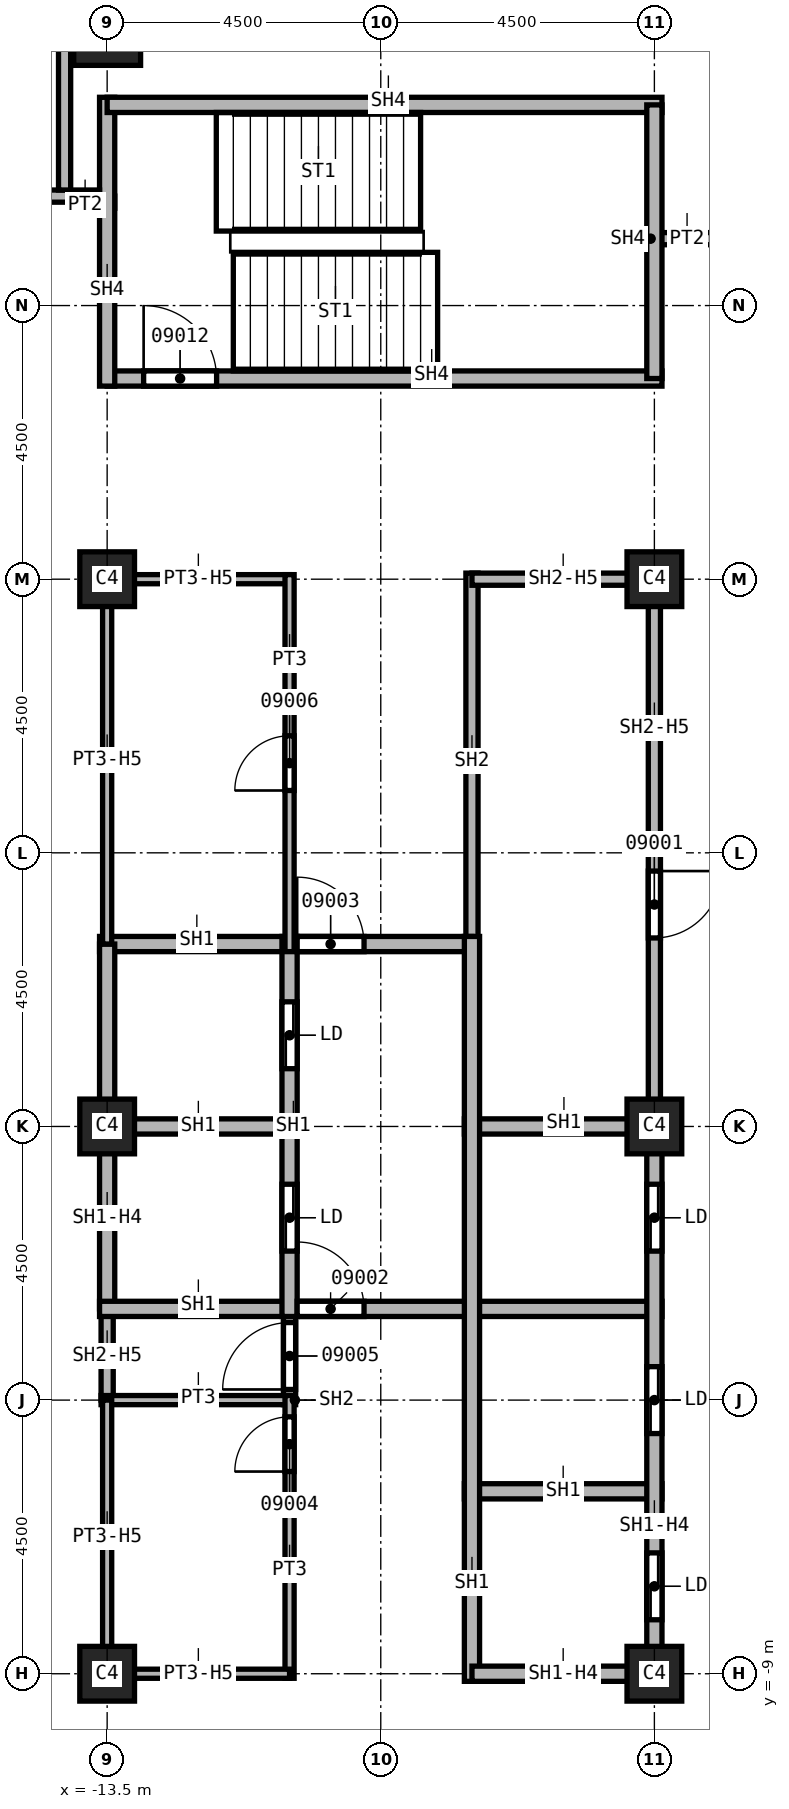
"""IFC4 building model, lengths in metres.
Left out: names, types, materials, properties, quantities, classifications, styles, units other than length and angle.
Written with IfcOpenShell. Run it as: python <this file> out.ifc"""

import sys

from ifc_helpers import new_model, si_unit, direction, frame, frame_2d, origin, origin_2d, place, context, subcontext, project, spatial, rectangle, extrude, element, fill, save


model = new_model("IFC4")
c1 = context("Model", 3, precision=1e-05, world=origin(), true_north=direction((0.0, 1.0)))
c2 = subcontext(c1, "Body", "Model", "MODEL_VIEW")
j1 = project(units=[si_unit("LENGTHUNIT", "METRE"), si_unit("PLANEANGLEUNIT", "RADIAN")], contexts=[c1])
p1 = place(None, origin())
s1 = spatial("IfcSite", under=j1, at=p1, CompositionType="ELEMENT")
p2 = place(p1, origin())
s2 = spatial("IfcBuilding", under=s1, at=p2, CompositionType="ELEMENT")
p3 = place(p2, frame((0.0, 0.0, 166.0)))
s3 = spatial("IfcBuildingStorey", under=s2, at=p3, CompositionType="ELEMENT", Elevation=166.0)
p4 = place(p3, frame((-13.5, 18.0, 0.0), z_axis=(0.0, 0.0, 1.0), x_axis=(1.0, 0.0, 0.0)))
e1 = element("IfcColumn", 1, at=p4, inside=s3, PredefinedType="COLUMN", context=c2, shape_type="SweptSolid", body=[
    extrude(rectangle(XDim=1.1, YDim=1.1, at=origin_2d()), origin(), (0.0, 0.0, 1.0), 3.7),
])
for number, where, z_axis, x_axis in (
    (2, (-4.5, 0.0, 0.0), (0.0, 0.0, 1.0), (1.0, 0.0, 0.0)),
    (3, (-4.5, 9.0, 0.0), (0.0, 0.0, 1.0), (1.0, 0.0, 0.0)),
    (4, (-4.5, -9.0, 0.0), (0.0, 0.0, 1.0), (1.0, 0.0, 0.0)),
    (5, (-13.5, 0.0, 0.0), (0.0, 0.0, 1.0), (1.0, 0.0, 0.0)),
    (6, (-13.5, 9.0, 0.0), (0.0, 0.0, 1.0), (1.0, 0.0, 0.0)),
    (7, (-13.5, -9.0, 0.0), (0.0, 0.0, 1.0), (1.0, 0.0, 0.0)),
):
    element("IfcColumn", number, at=place(p3, frame(where, z_axis=z_axis, x_axis=x_axis)), inside=s3, PredefinedType="COLUMN", context=c2, shape_type="SweptSolid", body=[
        extrude(rectangle(XDim=0.9, YDim=0.9, at=origin_2d()), origin(), (0.0, 0.0, 1.0), 3.7),
    ])
p5 = place(p3, frame((-14.1, 15.2, 0.0), z_axis=(0.0, 0.0, 1.0), x_axis=(1.0, 0.0, 0.0)))
e8 = element("IfcWall", 8, at=p5, inside=s3, PredefinedType="PARTITIONING", context=c2, shape_type="SweptSolid", body=[
    extrude(rectangle(XDim=0.725, YDim=0.2, at=frame_2d((0.363, 0.0))), origin(), (0.0, 0.0, 1.0), 3.7),
])
p6 = place(p3, frame((-4.5, 14.6, 0.0), z_axis=(0.0, 0.0, 1.0), x_axis=(1.0, 0.0, 0.0)))
e9 = element("IfcWall", 9, at=p6, inside=s3, PredefinedType="PARTITIONING", context=c2, shape_type="SweptSolid", body=[
    extrude(rectangle(XDim=0.95, YDim=0.2, at=frame_2d((0.475, 0.0))), origin(), (0.0, 0.0, 1.0), 3.7),
])
p7 = place(p3, frame((-13.5, -4.5, 0.0), z_axis=(0.0, 0.0, 1.0), x_axis=(0.0, 1.0, 0.0)))
e10 = element("IfcWall", 10, at=p7, inside=s3, PredefinedType="SOLIDWALL", context=c2, shape_type="SweptSolid", body=[
    extrude(rectangle(XDim=1.5, YDim=0.2, at=frame_2d((0.75, 0.0))), origin(), (0.0, 0.0, 1.0), 2.938),
])
p8 = place(p3, frame((-10.5, -4.575, 0.0), z_axis=(0.0, 0.0, 1.0), x_axis=(0.0, 1.0, 0.0)))
e11 = element("IfcWall", 11, at=p8, inside=s3, PredefinedType="SOLIDWALL", context=c2, shape_type="SweptSolid", body=[
    extrude(rectangle(XDim=1.7, YDim=0.2, at=frame_2d((0.85, 0.0))), origin(), (0.0, 0.0, 1.0), 3.7),
])
p9 = place(p8, frame((0.25, 0.0, 0.0)))
e12 = element("IfcOpeningElement", 12, at=p9, cuts=e11, PredefinedType="OPENING", context=c2, shape_type="SweptSolid", body=[
    extrude(rectangle(XDim=1.1, YDim=2.1, at=frame_2d((0.55, 1.05))), frame((0.0, 0.1, 0.0), z_axis=(0.0, -1.0, 0.0), x_axis=(1.0, 0.0, 0.0)), (0.0, 0.0, 1.0), 0.2),
])
p10 = place(p3, frame((-7.5, 2.875, 0.0), z_axis=(0.0, 0.0, 1.0), x_axis=(0.0, 1.0, 0.0)))
e13 = element("IfcWall", 13, at=p10, inside=s3, PredefinedType="SOLIDWALL", context=c2, shape_type="SweptSolid", body=[
    extrude(rectangle(XDim=6.225, YDim=0.2, at=frame_2d((3.113, 0.0))), origin(), (0.0, 0.0, 1.0), 3.7),
])
p11 = place(p3, frame((-7.5, 9.0, 0.0), z_axis=(0.0, 0.0, 1.0), x_axis=(1.0, 0.0, 0.0)))
e14 = element("IfcWall", 14, at=p11, inside=s3, PredefinedType="SOLIDWALL", context=c2, shape_type="SweptSolid", body=[
    extrude(rectangle(XDim=3.0, YDim=0.2, at=frame_2d((1.5, 0.0))), origin(), (0.0, 0.0, 1.0), 2.938),
])
p12 = place(p3, frame((-4.5, 9.1, 0.0), z_axis=(0.0, 0.0, 1.0), x_axis=(0.0, -1.0, 0.0)))
e15 = element("IfcWall", 15, at=p12, inside=s3, PredefinedType="SOLIDWALL", context=c2, shape_type="SweptSolid", body=[
    extrude(rectangle(XDim=9.1, YDim=0.2, at=frame_2d((4.55, 0.0))), origin(), (0.0, 0.0, 1.0), 2.938),
])
p13 = place(p12, frame((4.9, 0.0, 0.0)))
e16 = element("IfcOpeningElement", 16, at=p13, cuts=e15, PredefinedType="OPENING", context=c2, shape_type="SweptSolid", body=[
    extrude(rectangle(XDim=1.1, YDim=2.1, at=frame_2d((0.55, 1.05))), frame((0.0, 0.1, 0.0), z_axis=(0.0, -1.0, 0.0), x_axis=(1.0, 0.0, 0.0)), (0.0, 0.0, 1.0), 0.2),
])
p14 = place(p3, frame((-13.625, 0.0, 0.0), z_axis=(0.0, 0.0, 1.0), x_axis=(1.0, 0.0, 0.0)))
e17 = element("IfcWall", 17, at=p14, inside=s3, PredefinedType="SOLIDWALL", context=c2, shape_type="SweptSolid", body=[
    extrude(rectangle(XDim=3.125, YDim=0.25, at=frame_2d((1.562, 0.0))), origin(), (0.0, 0.0, 1.0), 3.7),
])
p15 = place(p3, frame((-13.625, 3.0, 0.0), z_axis=(0.0, 0.0, 1.0), x_axis=(1.0, 0.0, 0.0)))
e18 = element("IfcWall", 18, at=p15, inside=s3, PredefinedType="SOLIDWALL", context=c2, shape_type="SweptSolid", body=[
    extrude(rectangle(XDim=6.125, YDim=0.25, at=frame_2d((3.062, 0.0))), origin(), (0.0, 0.0, 1.0), 3.7),
])
p16 = place(p15, frame((3.25, 0.0, 0.0)))
e19 = element("IfcOpeningElement", 19, at=p16, cuts=e18, PredefinedType="OPENING", context=c2, shape_type="SweptSolid", body=[
    extrude(rectangle(XDim=1.1, YDim=2.1, at=frame_2d((0.55, 1.05))), frame((0.0, 0.125, 0.0), z_axis=(0.0, -1.0, 0.0), x_axis=(1.0, 0.0, 0.0)), (0.0, 0.0, 1.0), 0.25),
])
p17 = place(p3, frame((-13.5, -3.0, 0.0), z_axis=(0.0, 0.0, 1.0), x_axis=(0.0, 1.0, 0.0)))
e20 = element("IfcWall", 20, at=p17, inside=s3, PredefinedType="SOLIDWALL", context=c2, shape_type="SweptSolid", body=[
    extrude(rectangle(XDim=6.0, YDim=0.25, at=frame_2d((3.0, 0.0))), origin(), (0.0, 0.0, 1.0), 2.938),
])
p18 = place(p3, frame((-13.625, -3.0, 0.0), z_axis=(0.0, 0.0, 1.0), x_axis=(1.0, 0.0, 0.0)))
e21 = element("IfcWall", 21, at=p18, inside=s3, PredefinedType="SOLIDWALL", context=c2, shape_type="SweptSolid", body=[
    extrude(rectangle(XDim=9.25, YDim=0.25, at=frame_2d((4.625, 0.0))), origin(), (0.0, 0.0, 1.0), 3.7),
])
p19 = place(p18, frame((3.25, 0.0, 0.0)))
e22 = element("IfcOpeningElement", 22, at=p19, cuts=e21, PredefinedType="OPENING", context=c2, shape_type="SweptSolid", body=[
    extrude(rectangle(XDim=1.1, YDim=2.1, at=frame_2d((0.55, 1.05))), frame((0.0, 0.125, 0.0), z_axis=(0.0, -1.0, 0.0), x_axis=(1.0, 0.0, 0.0)), (0.0, 0.0, 1.0), 0.25),
])
p20 = place(p3, frame((-10.5, -3.125, 0.0), z_axis=(0.0, 0.0, 1.0), x_axis=(0.0, 1.0, 0.0)))
e23 = element("IfcWall", 23, at=p20, inside=s3, PredefinedType="SOLIDWALL", context=c2, shape_type="SweptSolid", body=[
    extrude(rectangle(XDim=6.25, YDim=0.25, at=frame_2d((3.125, 0.0))), origin(), (0.0, 0.0, 1.0), 3.7),
])
p21 = place(p20, frame((1.075, 0.0, 0.0)))
e24 = element("IfcOpeningElement", 24, at=p21, cuts=e23, PredefinedType="OPENING", context=c2, shape_type="SweptSolid", body=[
    extrude(rectangle(XDim=1.1, YDim=2.1, at=frame_2d((0.55, 1.05))), frame((0.0, 0.125, 0.0), z_axis=(0.0, -1.0, 0.0), x_axis=(1.0, 0.0, 0.0)), (0.0, 0.0, 1.0), 0.25),
])
p22 = place(p20, frame((4.075, 0.0, 0.0)))
e25 = element("IfcOpeningElement", 25, at=p22, cuts=e23, PredefinedType="OPENING", context=c2, shape_type="SweptSolid", body=[
    extrude(rectangle(XDim=1.1, YDim=2.1, at=frame_2d((0.55, 1.05))), frame((0.0, 0.125, 0.0), z_axis=(0.0, -1.0, 0.0), x_axis=(1.0, 0.0, 0.0)), (0.0, 0.0, 1.0), 0.25),
])
for number, where, z_axis, x_axis in (
    (26, (-7.625, -6.0, 0.0), (0.0, 0.0, 1.0), (1.0, 0.0, 0.0)),
    (27, (-7.625, 0.0, 0.0), (0.0, 0.0, 1.0), (1.0, 0.0, 0.0)),
):
    element("IfcWall", number, at=place(p3, frame(where, z_axis=z_axis, x_axis=x_axis)), inside=s3, PredefinedType="SOLIDWALL", context=c2, shape_type="SweptSolid", body=[
        extrude(rectangle(XDim=3.25, YDim=0.25, at=frame_2d((1.625, 0.0))), origin(), (0.0, 0.0, 1.0), 3.7),
    ])
p23 = place(p3, frame((-7.5, -9.125, 0.0), z_axis=(0.0, 0.0, 1.0), x_axis=(0.0, 1.0, 0.0)))
e28 = element("IfcWall", 28, at=p23, inside=s3, PredefinedType="SOLIDWALL", context=c2, shape_type="SweptSolid", body=[
    extrude(rectangle(XDim=12.25, YDim=0.25, at=frame_2d((6.125, 0.0))), origin(), (0.0, 0.0, 1.0), 3.7),
])
p24 = place(p3, frame((-4.5, -9.0, 0.0), z_axis=(0.0, 0.0, 1.0), x_axis=(-1.0, 0.0, 0.0)))
e29 = element("IfcWall", 29, at=p24, inside=s3, PredefinedType="SOLIDWALL", context=c2, shape_type="SweptSolid", body=[
    extrude(rectangle(XDim=3.0, YDim=0.25, at=frame_2d((1.5, 0.0))), origin(), (0.0, 0.0, 1.0), 2.938),
])
p25 = place(p3, frame((-4.5, 0.0, 0.0), z_axis=(0.0, 0.0, 1.0), x_axis=(0.0, -1.0, 0.0)))
e30 = element("IfcWall", 30, at=p25, inside=s3, PredefinedType="SOLIDWALL", context=c2, shape_type="SweptSolid", body=[
    extrude(rectangle(XDim=9.125, YDim=0.25, at=frame_2d((4.562, 0.0))), origin(), (0.0, 0.0, 1.0), 2.938),
])
p26 = place(p25, frame((7.012, 0.0, 0.0)))
e31 = element("IfcOpeningElement", 31, at=p26, cuts=e30, PredefinedType="OPENING", context=c2, shape_type="SweptSolid", body=[
    extrude(rectangle(XDim=1.1, YDim=2.1, at=frame_2d((0.55, 1.05))), frame((0.0, 0.125, 0.0), z_axis=(0.0, -1.0, 0.0), x_axis=(1.0, 0.0, 0.0)), (0.0, 0.0, 1.0), 0.25),
])
p27 = place(p25, frame((3.95, 0.0, 0.0)))
e32 = element("IfcOpeningElement", 32, at=p27, cuts=e30, PredefinedType="OPENING", context=c2, shape_type="SweptSolid", body=[
    extrude(rectangle(XDim=1.1, YDim=2.1, at=frame_2d((0.55, 1.05))), frame((0.0, 0.125, 0.0), z_axis=(0.0, -1.0, 0.0), x_axis=(1.0, 0.0, 0.0)), (0.0, 0.0, 1.0), 0.25),
])
p28 = place(p25, frame((0.95, 0.0, 0.0)))
e33 = element("IfcOpeningElement", 33, at=p28, cuts=e30, PredefinedType="OPENING", context=c2, shape_type="SweptSolid", body=[
    extrude(rectangle(XDim=1.1, YDim=2.1, at=frame_2d((0.55, 1.05))), frame((0.0, 0.125, 0.0), z_axis=(0.0, -1.0, 0.0), x_axis=(1.0, 0.0, 0.0)), (0.0, 0.0, 1.0), 0.25),
])
p29 = place(p3, frame((-13.5, 12.3, 0.0), z_axis=(0.0, 0.0, 1.0), x_axis=(1.0, 0.0, 0.0)))
e34 = element("IfcWall", 34, at=p29, inside=s3, PredefinedType="SOLIDWALL", context=c2, shape_type="SweptSolid", body=[
    extrude(rectangle(XDim=9.125, YDim=0.25, at=frame_2d((4.562, 0.0))), origin(), (0.0, 0.0, 1.0), 3.7),
])
p30 = place(p29, frame((0.6, 0.0, 0.0)))
e35 = element("IfcOpeningElement", 35, at=p30, cuts=e34, PredefinedType="OPENING", context=c2, shape_type="SweptSolid", body=[
    extrude(rectangle(XDim=1.2, YDim=2.1, at=frame_2d((0.6, 1.05))), frame((0.0, 0.125, 0.0), z_axis=(0.0, -1.0, 0.0), x_axis=(1.0, 0.0, 0.0)), (0.0, 0.0, 1.0), 0.25),
])
p31 = place(p3, frame((-13.5, 12.175, 0.0), z_axis=(0.0, 0.0, 1.0), x_axis=(0.0, 1.0, 0.0)))
e36 = element("IfcWall", 36, at=p31, inside=s3, PredefinedType="SOLIDWALL", context=c2, shape_type="SweptSolid", body=[
    extrude(rectangle(XDim=4.75, YDim=0.25, at=frame_2d((2.375, 0.0))), origin(), (0.0, 0.0, 1.0), 3.7),
])
p32 = place(p3, frame((-13.5, 16.8, 0.0), z_axis=(0.0, 0.0, 1.0), x_axis=(1.0, 0.0, 0.0)))
e37 = element("IfcWall", 37, at=p32, inside=s3, PredefinedType="SOLIDWALL", context=c2, shape_type="SweptSolid", body=[
    extrude(rectangle(XDim=9.125, YDim=0.25, at=frame_2d((4.562, 0.0))), origin(), (0.0, 0.0, 1.0), 3.7),
])
p33 = place(p3, frame((-4.5, 16.8, 0.0), z_axis=(0.0, 0.0, 1.0), x_axis=(0.0, -1.0, 0.0)))
e38 = element("IfcWall", 38, at=p33, inside=s3, PredefinedType="SOLIDWALL", context=c2, shape_type="SweptSolid", body=[
    extrude(rectangle(XDim=4.5, YDim=0.25, at=frame_2d((2.25, 0.0))), origin(), (0.0, 0.0, 1.0), 3.7),
])
p34 = place(p3, frame((-13.6, -4.5, 0.0), z_axis=(0.0, 0.0, 1.0), x_axis=(1.0, 0.0, 0.0)))
e39 = element("IfcWall", 39, at=p34, inside=s3, PredefinedType="PARTITIONING", context=c2, shape_type="SweptSolid", body=[
    extrude(rectangle(XDim=3.1, YDim=0.15, at=frame_2d((1.55, 0.0))), origin(), (0.0, 0.0, 1.0), 3.7),
])
p35 = place(p3, frame((-13.5, -9.075, 0.0), z_axis=(0.0, 0.0, 1.0), x_axis=(0.0, 1.0, 0.0)))
e40 = element("IfcWall", 40, at=p35, inside=s3, PredefinedType="PARTITIONING", context=c2, shape_type="SweptSolid", body=[
    extrude(rectangle(XDim=4.575, YDim=0.15, at=frame_2d((2.288, 0.0))), origin(), (0.0, 0.0, 1.0), 2.938),
])
p36 = place(p3, frame((-13.5, 3.0, 0.0), z_axis=(0.0, 0.0, 1.0), x_axis=(0.0, 1.0, 0.0)))
e41 = element("IfcWall", 41, at=p36, inside=s3, PredefinedType="PARTITIONING", context=c2, shape_type="SweptSolid", body=[
    extrude(rectangle(XDim=6.075, YDim=0.15, at=frame_2d((3.038, 0.0))), origin(), (0.0, 0.0, 1.0), 2.938),
])
p37 = place(p3, frame((-13.5, 9.0, 0.0), z_axis=(0.0, 0.0, 1.0), x_axis=(1.0, 0.0, 0.0)))
e42 = element("IfcWall", 42, at=p37, inside=s3, PredefinedType="PARTITIONING", context=c2, shape_type="SweptSolid", body=[
    extrude(rectangle(XDim=3.0, YDim=0.15, at=frame_2d((1.5, 0.0))), origin(), (0.0, 0.0, 1.0), 2.938),
])
p38 = place(p3, frame((-10.5, -9.075, 0.0), z_axis=(0.0, 0.0, 1.0), x_axis=(0.0, 1.0, 0.0)))
e43 = element("IfcWall", 43, at=p38, inside=s3, PredefinedType="PARTITIONING", context=c2, shape_type="SweptSolid", body=[
    extrude(rectangle(XDim=4.65, YDim=0.15, at=frame_2d((2.325, 0.0))), origin(), (0.0, 0.0, 1.0), 3.7),
])
p39 = place(p38, frame((3.4, 0.0, 0.0)))
e44 = element("IfcOpeningElement", 44, at=p39, cuts=e43, PredefinedType="OPENING", context=c2, shape_type="SweptSolid", body=[
    extrude(rectangle(XDim=0.9, YDim=2.1, at=frame_2d((0.45, 1.05))), frame((0.0, 0.075, 0.0), z_axis=(0.0, -1.0, 0.0), x_axis=(1.0, 0.0, 0.0)), (0.0, 0.0, 1.0), 0.15),
])
p40 = place(p3, frame((-10.5, -9.0, 0.0), z_axis=(0.0, 0.0, 1.0), x_axis=(-1.0, 0.0, 0.0)))
e45 = element("IfcWall", 45, at=p40, inside=s3, PredefinedType="PARTITIONING", context=c2, shape_type="SweptSolid", body=[
    extrude(rectangle(XDim=3.0, YDim=0.15, at=frame_2d((1.5, 0.0))), origin(), (0.0, 0.0, 1.0), 2.938),
])
p41 = place(p3, frame((-10.5, 2.875, 0.0), z_axis=(0.0, 0.0, 1.0), x_axis=(0.0, 1.0, 0.0)))
e46 = element("IfcWall", 46, at=p41, inside=s3, PredefinedType="PARTITIONING", context=c2, shape_type="SweptSolid", body=[
    extrude(rectangle(XDim=6.2, YDim=0.15, at=frame_2d((3.1, 0.0))), origin(), (0.0, 0.0, 1.0), 3.7),
])
p42 = place(p41, frame((2.65, 0.0, 0.0)))
e47 = element("IfcOpeningElement", 47, at=p42, cuts=e46, PredefinedType="OPENING", context=c2, shape_type="SweptSolid", body=[
    extrude(rectangle(XDim=0.9, YDim=2.1, at=frame_2d((0.45, 1.05))), frame((0.0, 0.075, 0.0), z_axis=(0.0, -1.0, 0.0), x_axis=(1.0, 0.0, 0.0)), (0.0, 0.0, 1.0), 0.15),
])
p43 = place(p3, frame((-21.9, 15.3, 0.0), z_axis=(0.0, 0.0, 1.0), x_axis=(1.0, 0.0, 0.0)))
e48 = element("IfcWall", 48, at=p43, inside=s3, PredefinedType="SOLIDWALL", context=c2, shape_type="SweptSolid", body=[
    extrude(rectangle(XDim=8.275, YDim=0.2, at=frame_2d((4.137, 0.0))), origin(), (0.0, 0.0, 1.0), 3.7),
])
p44 = place(p43, frame((4.8, 0.0, 0.0)))
e49 = element("IfcOpeningElement", 49, at=p44, cuts=e48, PredefinedType="OPENING", context=c2, shape_type="SweptSolid", body=[
    extrude(rectangle(XDim=1.2, YDim=2.1, at=frame_2d((0.6, 1.05))), frame((0.0, 0.1, 0.0), z_axis=(0.0, -1.0, 0.0), x_axis=(1.0, 0.0, 0.0)), (0.0, 0.0, 1.0), 0.2),
])
p45 = place(p3, frame((-14.2, 15.4, 0.0), z_axis=(0.0, 0.0, 1.0), x_axis=(0.0, 1.0, 0.0)))
e50 = element("IfcWall", 50, at=p45, inside=s3, PredefinedType="SOLIDWALL", context=c2, shape_type="SweptSolid", body=[
    extrude(rectangle(XDim=5.9, YDim=0.2, at=frame_2d((2.95, 0.0))), origin(), (0.0, 0.0, 1.0), 3.7),
])
p46 = place(p13, origin())
e51 = element("IfcDoor", 51, at=p46, inside=s3, OperationType="SINGLE_SWING_RIGHT", PredefinedType="DOOR", context=c2, shape_type="SweptSolid", body=[
    extrude(rectangle(XDim=1.1, YDim=2.1, at=frame_2d((0.55, 1.05))), frame((0.0, 0.025, 0.0), z_axis=(0.0, -1.0, 0.0), x_axis=(1.0, 0.0, 0.0)), (0.0, 0.0, 1.0), 0.05),
])
fill(e16, e51)
p47 = place(p19, origin())
e52 = element("IfcDoor", 52, at=p47, inside=s3, OperationType="SINGLE_SWING_LEFT", PredefinedType="DOOR", context=c2, shape_type="SweptSolid", body=[
    extrude(rectangle(XDim=1.1, YDim=2.1, at=frame_2d((0.55, 1.05))), frame((0.0, 0.025, 0.0), z_axis=(0.0, -1.0, 0.0), x_axis=(1.0, 0.0, 0.0)), (0.0, 0.0, 1.0), 0.05),
])
fill(e22, e52)
p48 = place(p16, origin())
e53 = element("IfcDoor", 53, at=p48, inside=s3, OperationType="SINGLE_SWING_RIGHT", PredefinedType="DOOR", context=c2, shape_type="SweptSolid", body=[
    extrude(rectangle(XDim=1.1, YDim=2.1, at=frame_2d((0.55, 1.05))), frame((0.0, 0.025, 0.0), z_axis=(0.0, -1.0, 0.0), x_axis=(1.0, 0.0, 0.0)), (0.0, 0.0, 1.0), 0.05),
])
fill(e19, e53)
p49 = place(p39, origin())
e54 = element("IfcDoor", 54, at=p49, inside=s3, OperationType="SINGLE_SWING_LEFT", PredefinedType="DOOR", context=c2, shape_type="SweptSolid", body=[
    extrude(rectangle(XDim=0.9, YDim=2.1, at=frame_2d((0.45, 1.05))), frame((0.0, 0.025, 0.0), z_axis=(0.0, -1.0, 0.0), x_axis=(1.0, 0.0, 0.0)), (0.0, 0.0, 1.0), 0.05),
])
fill(e44, e54)
p50 = place(p9, origin())
e55 = element("IfcDoor", 55, at=p50, inside=s3, OperationType="SINGLE_SWING_RIGHT", PredefinedType="DOOR", context=c2, shape_type="SweptSolid", body=[
    extrude(rectangle(XDim=1.1, YDim=2.1, at=frame_2d((0.55, 1.05))), frame((0.0, 0.025, 0.0), z_axis=(0.0, -1.0, 0.0), x_axis=(1.0, 0.0, 0.0)), (0.0, 0.0, 1.0), 0.05),
])
fill(e12, e55)
p51 = place(p42, origin())
e56 = element("IfcDoor", 56, at=p51, inside=s3, OperationType="SINGLE_SWING_LEFT", PredefinedType="DOOR", context=c2, shape_type="SweptSolid", body=[
    extrude(rectangle(XDim=0.9, YDim=2.1, at=frame_2d((0.45, 1.05))), frame((0.0, 0.025, 0.0), z_axis=(0.0, -1.0, 0.0), x_axis=(1.0, 0.0, 0.0)), (0.0, 0.0, 1.0), 0.05),
])
fill(e47, e56)
p52 = place(p30, origin())
e57 = element("IfcDoor", 57, at=p52, inside=s3, OperationType="SINGLE_SWING_LEFT", PredefinedType="DOOR", context=c2, shape_type="SweptSolid", body=[
    extrude(rectangle(XDim=1.2, YDim=2.1, at=frame_2d((0.6, 1.05))), frame((0.0, 0.025, 0.0), z_axis=(0.0, -1.0, 0.0), x_axis=(1.0, 0.0, 0.0)), (0.0, 0.0, 1.0), 0.05),
])
fill(e35, e57)
p53 = place(p26, origin())
e58 = element("IfcDoor", 58, at=p53, inside=s3, OperationType="SLIDING_TO_LEFT", PredefinedType="DOOR", context=c2, shape_type="SweptSolid", body=[
    extrude(rectangle(XDim=1.1, YDim=2.1, at=frame_2d((0.55, 1.05))), frame((0.0, 0.025, 0.0), z_axis=(0.0, -1.0, 0.0), x_axis=(1.0, 0.0, 0.0)), (0.0, 0.0, 1.0), 0.05),
])
fill(e31, e58)
p54 = place(p27, origin())
e59 = element("IfcDoor", 59, at=p54, inside=s3, OperationType="SLIDING_TO_LEFT", PredefinedType="DOOR", context=c2, shape_type="SweptSolid", body=[
    extrude(rectangle(XDim=1.1, YDim=2.1, at=frame_2d((0.55, 1.05))), frame((0.0, 0.025, 0.0), z_axis=(0.0, -1.0, 0.0), x_axis=(1.0, 0.0, 0.0)), (0.0, 0.0, 1.0), 0.05),
])
fill(e32, e59)
p55 = place(p28, origin())
e60 = element("IfcDoor", 60, at=p55, inside=s3, OperationType="SLIDING_TO_LEFT", PredefinedType="DOOR", context=c2, shape_type="SweptSolid", body=[
    extrude(rectangle(XDim=1.1, YDim=2.1, at=frame_2d((0.55, 1.05))), frame((0.0, 0.025, 0.0), z_axis=(0.0, -1.0, 0.0), x_axis=(1.0, 0.0, 0.0)), (0.0, 0.0, 1.0), 0.05),
])
fill(e33, e60)
p56 = place(p21, origin())
e61 = element("IfcDoor", 61, at=p56, inside=s3, OperationType="SLIDING_TO_LEFT", PredefinedType="DOOR", context=c2, shape_type="SweptSolid", body=[
    extrude(rectangle(XDim=1.1, YDim=2.1, at=frame_2d((0.55, 1.05))), frame((0.0, 0.025, 0.0), z_axis=(0.0, -1.0, 0.0), x_axis=(1.0, 0.0, 0.0)), (0.0, 0.0, 1.0), 0.05),
])
fill(e24, e61)
p57 = place(p22, origin())
e62 = element("IfcDoor", 62, at=p57, inside=s3, OperationType="SLIDING_TO_LEFT", PredefinedType="DOOR", context=c2, shape_type="SweptSolid", body=[
    extrude(rectangle(XDim=1.1, YDim=2.1, at=frame_2d((0.55, 1.05))), frame((0.0, 0.025, 0.0), z_axis=(0.0, -1.0, 0.0), x_axis=(1.0, 0.0, 0.0)), (0.0, 0.0, 1.0), 0.05),
])
fill(e25, e62)
save(model, sys.argv[1])
